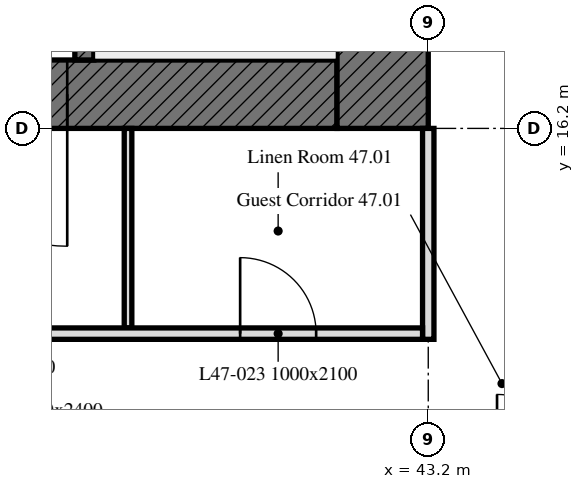
"""IFC4 building model, lengths in metres.
Left out: names, types, materials, properties, quantities, classifications, styles, units other than length and angle.
Written with IfcOpenShell. Run it as: python <this file> out.ifc"""

import sys

from ifc_helpers import new_model, si_unit, direction, frame, frame_2d, origin, place, context, subcontext, project, spatial, rectangle, extrude, element, fill, save


model = new_model("IFC4")
c1 = context("Model", 3, precision=1e-05, world=origin(), true_north=direction((0.0, 1.0)))
c2 = subcontext(c1, "Body", "Model", "MODEL_VIEW")
j1 = project(units=[si_unit("LENGTHUNIT", "METRE"), si_unit("PLANEANGLEUNIT", "RADIAN")], contexts=[c1])
p1 = place(None, origin())
s1 = spatial("IfcSite", under=j1, at=p1, CompositionType="ELEMENT")
p2 = place(p1, origin())
s2 = spatial("IfcBuilding", under=s1, at=p2, CompositionType="ELEMENT")
p3 = place(p2, frame((0.0, 0.0, 193.9)))
s3 = spatial("IfcBuildingStorey", under=s2, at=p3, CompositionType="ELEMENT", Elevation=193.9)
p4 = place(p3, frame((42.0, 16.65, 0.0), z_axis=(0.0, 0.0, 1.0), x_axis=(-1.0, 0.0, 0.0)))
e1 = element("IfcWall", 1, at=p4, inside=s3, PredefinedType="SOLIDWALL", context=c2, shape_type="SweptSolid", body=[
    extrude(rectangle(XDim=11.1, YDim=0.9, at=frame_2d((5.55, 0.0))), origin(), (0.0, 0.0, 1.0), 3.0),
])
p5 = place(p4, frame((3.55, 0.0, 0.0)))
e2 = element("IfcOpeningElement", 2, at=p5, cuts=e1, PredefinedType="OPENING", context=c2, shape_type="SweptSolid", body=[
    extrude(rectangle(XDim=2.0, YDim=2.4, at=frame_2d((1.0, 1.2))), frame((0.0, 0.45, 0.0), z_axis=(0.0, -1.0, 0.0), x_axis=(1.0, 0.0, 0.0)), (0.0, 0.0, 1.0), 0.9),
])
p6 = place(p3, frame((42.6, 32.4, 0.0), z_axis=(0.0, 0.0, 1.0), x_axis=(0.0, -1.0, 0.0)))
e3 = element("IfcWall", 3, at=p6, inside=s3, PredefinedType="SOLIDWALL", context=c2, shape_type="SweptSolid", body=[
    extrude(rectangle(XDim=16.2, YDim=1.2, at=frame_2d((8.1, 0.0))), origin(), (0.0, 0.0, 1.0), 3.0),
])
p7 = place(p3, frame((38.675, 17.1, 0.0), z_axis=(0.0, 0.0, 1.0), x_axis=(0.0, 1.0, 0.0)))
e4 = element("IfcWall", 4, at=p7, inside=s3, PredefinedType="SOLIDWALL", context=c2, shape_type="SweptSolid", body=[
    extrude(rectangle(XDim=14.4, YDim=0.25, at=frame_2d((7.2, 0.0))), origin(), (0.0, 0.0, 1.0), 3.0),
])
p8 = place(p7, frame((4.6, 0.0, 0.0)))
e5 = element("IfcOpeningElement", 5, at=p8, cuts=e4, PredefinedType="OPENING", context=c2, shape_type="SweptSolid", body=[
    extrude(rectangle(XDim=1.0, YDim=2.1, at=frame_2d((0.5, 1.05))), frame((0.0, 0.125, 0.0), z_axis=(0.0, -1.0, 0.0), x_axis=(1.0, 0.0, 0.0)), (0.0, 0.0, 1.0), 0.25),
])
p9 = place(p7, frame((7.062, 0.0, 0.0)))
e6 = element("IfcOpeningElement", 6, at=p9, cuts=e4, PredefinedType="OPENING", context=c2, shape_type="SweptSolid", body=[
    extrude(rectangle(XDim=1.2, YDim=2.1, at=frame_2d((0.6, 1.05))), frame((0.0, 0.125, 0.0), z_axis=(0.0, -1.0, 0.0), x_axis=(1.0, 0.0, 0.0)), (0.0, 0.0, 1.0), 0.25),
])
p10 = place(p7, frame((9.472, 0.0, 0.0)))
e7 = element("IfcOpeningElement", 7, at=p10, cuts=e4, PredefinedType="OPENING", context=c2, shape_type="SweptSolid", body=[
    extrude(rectangle(XDim=0.9, YDim=2.1, at=frame_2d((0.45, 1.05))), frame((0.0, 0.125, 0.0), z_axis=(0.0, -1.0, 0.0), x_axis=(1.0, 0.0, 0.0)), (0.0, 0.0, 1.0), 0.25),
])
p11 = place(p7, frame((11.159, 0.0, 0.0)))
e8 = element("IfcOpeningElement", 8, at=p11, cuts=e4, PredefinedType="OPENING", context=c2, shape_type="SweptSolid", body=[
    extrude(rectangle(XDim=0.9, YDim=2.1, at=frame_2d((0.45, 1.05))), frame((0.0, 0.125, 0.0), z_axis=(0.0, -1.0, 0.0), x_axis=(1.0, 0.0, 0.0)), (0.0, 0.0, 1.0), 0.25),
])
p12 = place(p7, frame((13.1, 0.0, 0.0)))
e9 = element("IfcOpeningElement", 9, at=p12, cuts=e4, PredefinedType="OPENING", context=c2, shape_type="SweptSolid", body=[
    extrude(rectangle(XDim=0.9, YDim=2.1, at=frame_2d((0.45, 1.05))), frame((0.0, 0.125, 0.0), z_axis=(0.0, -1.0, 0.0), x_axis=(1.0, 0.0, 0.0)), (0.0, 0.0, 1.0), 0.25),
])
p13 = place(p3, frame((39.25, 13.575, 0.0), z_axis=(0.0, 0.0, 1.0), x_axis=(0.0, 1.0, 0.0)))
e10 = element("IfcWall", 10, at=p13, inside=s3, PredefinedType="PARTITIONING", context=c2, shape_type="SweptSolid", body=[
    extrude(rectangle(XDim=2.625, YDim=0.1, at=frame_2d((1.312, 0.0))), origin(), (0.0, 0.0, 1.0), 3.0),
])
p14 = place(p3, frame((43.2, 16.2, 0.0), z_axis=(0.0, 0.0, 1.0), x_axis=(0.0, -1.0, 0.0)))
e11 = element("IfcWall", 11, at=p14, inside=s3, PredefinedType="PARTITIONING", context=c2, shape_type="SweptSolid", body=[
    extrude(rectangle(XDim=2.775, YDim=0.15, at=frame_2d((1.387, 0.0))), origin(), (0.0, 0.0, 1.0), 3.0),
])
p15 = place(p3, frame((9.45, 13.5, 0.0), z_axis=(0.0, 0.0, 1.0), x_axis=(1.0, 0.0, 0.0)))
e12 = element("IfcWall", 12, at=p15, inside=s3, PredefinedType="PARTITIONING", context=c2, shape_type="SweptSolid", body=[
    extrude(rectangle(XDim=33.675, YDim=0.15, at=frame_2d((16.837, 0.0))), origin(), (0.0, 0.0, 1.0), 3.0),
])
p16 = place(p15, frame((8.95, 0.0, 0.0)))
e13 = element("IfcOpeningElement", 13, at=p16, cuts=e12, PredefinedType="OPENING", context=c2, shape_type="SweptSolid", body=[
    extrude(rectangle(XDim=1.0, YDim=2.1, at=frame_2d((0.5, 1.05))), frame((0.0, 0.075, 0.0), z_axis=(0.0, -1.0, 0.0), x_axis=(1.0, 0.0, 0.0)), (0.0, 0.0, 1.0), 0.15),
])
p17 = place(p15, frame((15.517, 0.0, 0.0)))
e14 = element("IfcOpeningElement", 14, at=p17, cuts=e12, PredefinedType="OPENING", context=c2, shape_type="SweptSolid", body=[
    extrude(rectangle(XDim=1.0, YDim=2.1, at=frame_2d((0.5, 1.05))), frame((0.0, 0.075, 0.0), z_axis=(0.0, -1.0, 0.0), x_axis=(1.0, 0.0, 0.0)), (0.0, 0.0, 1.0), 0.15),
])
p18 = place(p15, frame((24.075, 0.0, 0.0)))
e15 = element("IfcOpeningElement", 15, at=p18, cuts=e12, PredefinedType="OPENING", context=c2, shape_type="SweptSolid", body=[
    extrude(rectangle(XDim=1.0, YDim=2.1, at=frame_2d((0.5, 1.05))), frame((0.0, 0.075, 0.0), z_axis=(0.0, -1.0, 0.0), x_axis=(1.0, 0.0, 0.0)), (0.0, 0.0, 1.0), 0.15),
])
p19 = place(p15, frame((31.275, 0.0, 0.0)))
e16 = element("IfcOpeningElement", 16, at=p19, cuts=e12, PredefinedType="OPENING", context=c2, shape_type="SweptSolid", body=[
    extrude(rectangle(XDim=1.0, YDim=2.1, at=frame_2d((0.5, 1.05))), frame((0.0, 0.075, 0.0), z_axis=(0.0, -1.0, 0.0), x_axis=(1.0, 0.0, 0.0)), (0.0, 0.0, 1.0), 0.15),
])
p20 = place(p15, frame((4.625, 0.0, 0.0)))
e17 = element("IfcOpeningElement", 17, at=p20, cuts=e12, PredefinedType="OPENING", context=c2, shape_type="SweptSolid", body=[
    extrude(rectangle(XDim=1.0, YDim=2.1, at=frame_2d((0.5, 1.05))), frame((0.0, 0.075, 0.0), z_axis=(0.0, -1.0, 0.0), x_axis=(1.0, 0.0, 0.0)), (0.0, 0.0, 1.0), 0.15),
])
p21 = place(p15, frame((1.4, 0.0, 0.0)))
e18 = element("IfcOpeningElement", 18, at=p21, cuts=e12, PredefinedType="OPENING", context=c2, shape_type="SweptSolid", body=[
    extrude(rectangle(XDim=1.8, YDim=2.4, at=frame_2d((0.9, 1.2))), frame((0.0, 0.075, 0.0), z_axis=(0.0, -1.0, 0.0), x_axis=(1.0, 0.0, 0.0)), (0.0, 0.0, 1.0), 0.15),
])
p22 = place(p15, frame((26.5, 0.0, 0.0)))
e19 = element("IfcOpeningElement", 19, at=p22, cuts=e12, PredefinedType="OPENING", context=c2, shape_type="SweptSolid", body=[
    extrude(rectangle(XDim=1.8, YDim=2.4, at=frame_2d((0.9, 1.2))), frame((0.0, 0.075, 0.0), z_axis=(0.0, -1.0, 0.0), x_axis=(1.0, 0.0, 0.0)), (0.0, 0.0, 1.0), 0.15),
])
p23 = place(p5, origin())
e20 = element("IfcDoor", 20, at=p23, inside=s3, OperationType="DOUBLE_DOOR_SINGLE_SWING", PredefinedType="DOOR", context=c2, shape_type="SweptSolid", body=[
    extrude(rectangle(XDim=2.0, YDim=2.4, at=frame_2d((1.0, 1.2))), frame((0.0, 0.025, 0.0), z_axis=(0.0, -1.0, 0.0), x_axis=(1.0, 0.0, 0.0)), (0.0, 0.0, 1.0), 0.05),
])
fill(e2, e20)
p24 = place(p19, origin())
e21 = element("IfcDoor", 21, at=p24, inside=s3, OperationType="SINGLE_SWING_RIGHT", PredefinedType="DOOR", context=c2, shape_type="SweptSolid", body=[
    extrude(rectangle(XDim=1.0, YDim=2.1, at=frame_2d((0.5, 1.05))), frame((0.0, 0.025, 0.0), z_axis=(0.0, -1.0, 0.0), x_axis=(1.0, 0.0, 0.0)), (0.0, 0.0, 1.0), 0.05),
])
fill(e16, e21)
save(model, sys.argv[1])
